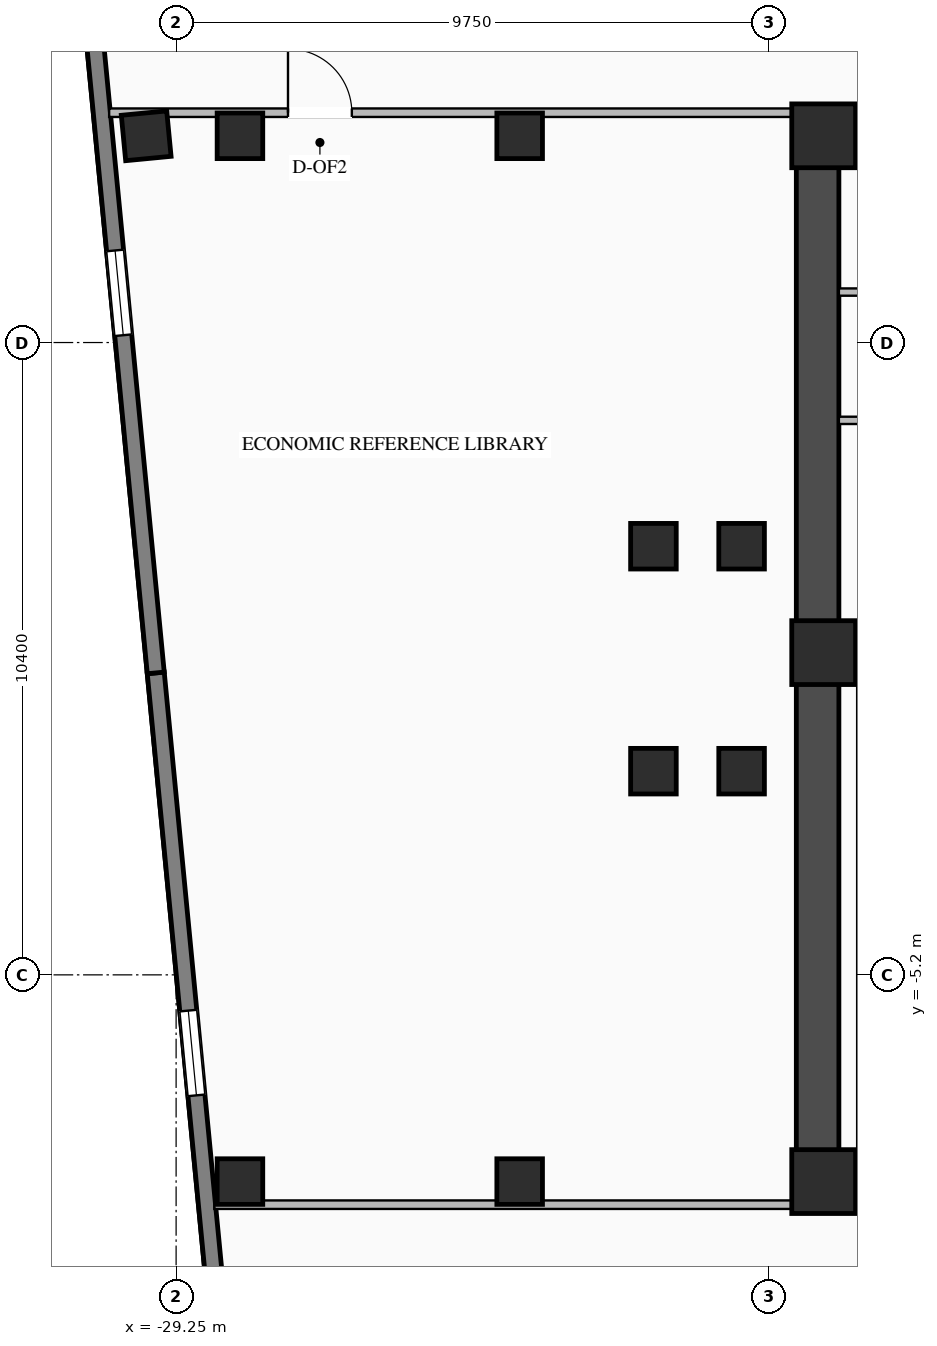
"""IFC4 building model, lengths in metres.
Left out: names, types, materials, properties, quantities, classifications, styles, units other than length and angle.
Written with IfcOpenShell. Run it as: python <this file> out.ifc"""

import sys

from ifc_helpers import new_model, si_unit, direction, frame, frame_2d, origin, origin_2d, place, context, subcontext, project, spatial, rectangle, i_section, extrude, element, fill, save


model = new_model("IFC4")
c1 = context("Model", 3, precision=1e-05, world=origin(), true_north=direction((0.0, 1.0)))
c2 = subcontext(c1, "Body", "Model", "MODEL_VIEW")
j1 = project(units=[si_unit("LENGTHUNIT", "METRE"), si_unit("PLANEANGLEUNIT", "RADIAN")], contexts=[c1])
p1 = place(None, origin())
s1 = spatial("IfcSite", under=j1, at=p1, CompositionType="ELEMENT")
p2 = place(p1, origin())
s2 = spatial("IfcBuilding", under=s1, at=p2, CompositionType="ELEMENT")
p3 = place(p2, frame((0.0, 0.0, 108.7)))
s3 = spatial("IfcBuildingStorey", under=s2, at=p3, CompositionType="ELEMENT", Elevation=108.7)
p4 = place(p3, frame((-19.05, -8.7, 0.0), z_axis=(0.0, 0.0, 1.0), x_axis=(1.0, 0.0, 0.0)))
e1 = element("IfcWall", 1, at=p4, inside=s3, PredefinedType="SHEAR", context=c2, shape_type="SweptSolid", body=[
    extrude(rectangle(XDim=10.25, YDim=0.7, at=frame_2d((5.125, 0.0))), origin(), (0.0, 0.0, 1.0), 3.17),
])
p5 = place(p3, frame((-19.05, 8.7, 0.0), z_axis=(0.0, 0.0, 1.0), x_axis=(1.0, 0.0, 0.0)))
e2 = element("IfcWall", 2, at=p5, inside=s3, PredefinedType="SHEAR", context=c2, shape_type="SweptSolid", body=[
    extrude(rectangle(XDim=10.25, YDim=0.7, at=frame_2d((5.125, 0.0))), origin(), (0.0, 0.0, 1.0), 3.17),
])
p6 = place(p5, frame((5.6, 0.0, 0.0)))
e3 = element("IfcOpeningElement", 3, at=p6, cuts=e2, PredefinedType="OPENING", context=c2, shape_type="SweptSolid", body=[
    extrude(rectangle(XDim=1.4, YDim=2.05, at=frame_2d((0.7, 1.025))), frame((0.0, 0.36, 0.0), z_axis=(0.0, -1.0, 0.0), x_axis=(1.0, 0.0, 0.0)), (0.0, 0.0, 1.0), 0.72),
])
p7 = place(p3, frame((-18.7, -8.35, 0.0), z_axis=(0.0, 0.0, 1.0), x_axis=(0.0, 1.0, 0.0)))
e4 = element("IfcWall", 4, at=p7, inside=s3, PredefinedType="SHEAR", context=c2, shape_type="SweptSolid", body=[
    extrude(rectangle(XDim=16.7, YDim=0.7, at=frame_2d((8.35, 0.0))), origin(), (0.0, 0.0, 1.0), 3.17),
])
for number, where, z_axis, x_axis in (
    (5, (-18.6, -8.6, 0.0), (0.0, 0.0, 1.0), (1.0, 0.0, 0.0)),
    (6, (-18.6, 0.1, 0.0), (0.0, 0.0, 1.0), (1.0, 0.0, 0.0)),
    (7, (-18.6, 8.6, 0.0), (0.0, 0.0, 1.0), (1.0, 0.0, 0.0)),
):
    element("IfcColumn", number, at=place(p3, frame(where, z_axis=z_axis, x_axis=x_axis)), inside=s3, PredefinedType="COLUMN", context=c2, shape_type="SweptSolid", body=[
        extrude(rectangle(XDim=1.05, YDim=1.05, at=origin_2d()), origin(), (0.0, 0.0, 1.0), 3.45),
    ])
for number, where, z_axis, x_axis in (
    (8, (-21.4, -1.85, 0.0), (0.0, 0.0, 1.0), (1.0, 0.0, 0.0)),
    (9, (-21.4, 1.85, 0.0), (0.0, 0.0, 1.0), (1.0, 0.0, 0.0)),
    (10, (-19.95, -1.85, 0.0), (0.0, 0.0, 1.0), (1.0, 0.0, 0.0)),
    (11, (-19.95, 1.85, 0.0), (0.0, 0.0, 1.0), (1.0, 0.0, 0.0)),
    (12, (-23.6, -8.6, 0.0), (0.0, 0.0, 1.0), (1.0, 0.0, 0.0)),
    (13, (-23.6, 8.6, 0.0), (0.0, 0.0, 1.0), (1.0, 0.0, 0.0)),
    (14, (-28.2, -8.6, 0.0), (0.0, 0.0, 1.0), (1.0, 0.0, 0.0)),
    (15, (-28.2, 8.6, 0.0), (0.0, 0.0, 1.0), (1.0, 0.0, 0.0)),
    (16, (-29.742, 8.6, 0.0), (0.0, 0.0, 1.0), (0.995, 0.096, 0.0)),
):
    element("IfcColumn", number, at=place(p3, frame(where, z_axis=z_axis, x_axis=x_axis)), inside=s3, PredefinedType="COLUMN", context=c2, shape_type="SweptSolid", body=[
        extrude(i_section(OverallWidth=0.75, OverallDepth=0.75, WebThickness=0.03, FlangeThickness=0.044, at=origin_2d()), origin(), (0.0, 0.0, 1.0), 3.45),
    ])
p8 = place(p3, frame((-27.779, -18.987, 0.0), z_axis=(0.0, 0.0, 1.0), x_axis=(-0.095842534142, 0.995396508256, 0.0)))
e17 = element("IfcWall", 17, at=p8, inside=s3, PredefinedType="STANDARD", context=c2, shape_type="SweptSolid", body=[
    extrude(rectangle(XDim=18.84, YDim=0.28, at=frame_2d((9.42, 0.0))), origin(), (0.0, 0.0, 1.0), 3.15),
])
p9 = place(p8, frame((5.58, 0.0, 0.76)))
e18 = element("IfcOpeningElement", 18, at=p9, cuts=e17, PredefinedType="OPENING", context=c2, shape_type="SweptSolid", body=[
    extrude(rectangle(XDim=1.4, YDim=1.95, at=frame_2d((0.7, 0.975))), frame((0.0, 0.15, 0.0), z_axis=(0.0, -1.0, 0.0), x_axis=(1.0, 0.0, 0.0)), (0.0, 0.0, 1.0), 0.3),
])
p10 = place(p8, frame((11.86, 0.0, 0.76)))
e19 = element("IfcOpeningElement", 19, at=p10, cuts=e17, PredefinedType="OPENING", context=c2, shape_type="SweptSolid", body=[
    extrude(rectangle(XDim=1.4, YDim=1.95, at=frame_2d((0.7, 0.975))), frame((0.0, 0.15, 0.0), z_axis=(0.0, -1.0, 0.0), x_axis=(1.0, 0.0, 0.0)), (0.0, 0.0, 1.0), 0.3),
])
p11 = place(p3, frame((-29.585, -0.234, 0.0), z_axis=(0.0, 0.0, 1.0), x_axis=(-0.095841297881, 0.99539662729, 0.0)))
e20 = element("IfcWall", 20, at=p11, inside=s3, PredefinedType="STANDARD", context=c2, shape_type="SweptSolid", body=[
    extrude(rectangle(XDim=18.84, YDim=0.28, at=frame_2d((9.42, 0.0))), origin(), (0.0, 0.0, 1.0), 3.15),
])
p12 = place(p11, frame((5.58, 0.0, 0.76)))
e21 = element("IfcOpeningElement", 21, at=p12, cuts=e20, PredefinedType="OPENING", context=c2, shape_type="SweptSolid", body=[
    extrude(rectangle(XDim=1.4, YDim=1.95, at=frame_2d((0.7, 0.975))), frame((0.0, 0.15, 0.0), z_axis=(0.0, -1.0, 0.0), x_axis=(1.0, 0.0, 0.0)), (0.0, 0.0, 1.0), 0.3),
])
p13 = place(p11, frame((11.86, 0.0, 0.76)))
e22 = element("IfcOpeningElement", 22, at=p13, cuts=e20, PredefinedType="OPENING", context=c2, shape_type="SweptSolid", body=[
    extrude(rectangle(XDim=1.4, YDim=1.95, at=frame_2d((0.7, 0.975))), frame((0.0, 0.15, 0.0), z_axis=(0.0, -1.0, 0.0), x_axis=(1.0, 0.0, 0.0)), (0.0, 0.0, 1.0), 0.3),
])
p14 = place(p3, frame((-18.35, 3.92, 0.0), z_axis=(0.0, 0.0, 1.0), x_axis=(1.0, 0.0, 0.0)))
e23 = element("IfcWall", 23, at=p14, inside=s3, PredefinedType="STANDARD", context=c2, shape_type="SweptSolid", body=[
    extrude(rectangle(XDim=4.45, YDim=0.12, at=frame_2d((2.225, 0.0))), origin(), (0.0, 0.0, 1.0), 3.15),
])
p15 = place(p3, frame((-18.35, 6.03, 0.0), z_axis=(0.0, 0.0, 1.0), x_axis=(1.0, 0.0, 0.0)))
e24 = element("IfcWall", 24, at=p15, inside=s3, PredefinedType="STANDARD", context=c2, shape_type="SweptSolid", body=[
    extrude(rectangle(XDim=2.2, YDim=0.12, at=frame_2d((1.1, 0.0))), origin(), (0.0, 0.0, 1.0), 3.15),
])
p16 = place(p3, frame((-30.351, 8.98, 0.0), z_axis=(0.0, 0.0, 1.0), x_axis=(1.0, 0.0, 0.0)))
e25 = element("IfcWall", 25, at=p16, inside=s3, PredefinedType="STANDARD", context=c2, shape_type="SweptSolid", body=[
    extrude(rectangle(XDim=11.301, YDim=0.14, at=frame_2d((5.651, 0.0))), origin(), (0.0, 0.0, 1.0), 3.15),
])
p17 = place(p16, frame((2.941, 0.0, 0.0)))
e26 = element("IfcOpeningElement", 26, at=p17, cuts=e25, PredefinedType="OPENING", context=c2, shape_type="SweptSolid", body=[
    extrude(rectangle(XDim=1.05, YDim=2.08, at=frame_2d((0.525, 1.04))), frame((0.0, 0.08, 0.0), z_axis=(0.0, -1.0, 0.0), x_axis=(1.0, 0.0, 0.0)), (0.0, 0.0, 1.0), 0.16),
])
p18 = place(p3, frame((-28.622, -8.98, 0.0), z_axis=(0.0, 0.0, 1.0), x_axis=(1.0, 0.0, 0.0)))
e27 = element("IfcWall", 27, at=p18, inside=s3, PredefinedType="STANDARD", context=c2, shape_type="SweptSolid", body=[
    extrude(rectangle(XDim=9.572, YDim=0.14, at=frame_2d((4.786, 0.0))), origin(), (0.0, 0.0, 1.0), 3.15),
])
p19 = place(p10, origin())
e28 = element("IfcWindow", 28, at=p19, inside=s3, PartitioningType="SINGLE_PANEL", PredefinedType="WINDOW", context=c2, shape_type="SweptSolid", body=[
    extrude(rectangle(XDim=1.4, YDim=1.95, at=frame_2d((0.7, 0.975))), frame((0.0, 0.03, 0.0), z_axis=(0.0, -1.0, 0.0), x_axis=(1.0, 0.0, 0.0)), (0.0, 0.0, 1.0), 0.06),
])
fill(e19, e28)
p20 = place(p12, origin())
e29 = element("IfcWindow", 29, at=p20, inside=s3, PartitioningType="SINGLE_PANEL", PredefinedType="WINDOW", context=c2, shape_type="SweptSolid", body=[
    extrude(rectangle(XDim=1.4, YDim=1.95, at=frame_2d((0.7, 0.975))), frame((0.0, 0.03, 0.0), z_axis=(0.0, -1.0, 0.0), x_axis=(1.0, 0.0, 0.0)), (0.0, 0.0, 1.0), 0.06),
])
fill(e21, e29)
p21 = place(p17, origin())
e30 = element("IfcDoor", 30, at=p21, inside=s3, OperationType="SINGLE_SWING_LEFT", PredefinedType="DOOR", context=c2, shape_type="SweptSolid", body=[
    extrude(rectangle(XDim=1.05, YDim=2.08, at=frame_2d((0.525, 1.04))), frame((0.0, 0.025, 0.0), z_axis=(0.0, -1.0, 0.0), x_axis=(1.0, 0.0, 0.0)), (0.0, 0.0, 1.0), 0.05),
])
fill(e26, e30)
save(model, sys.argv[1])
